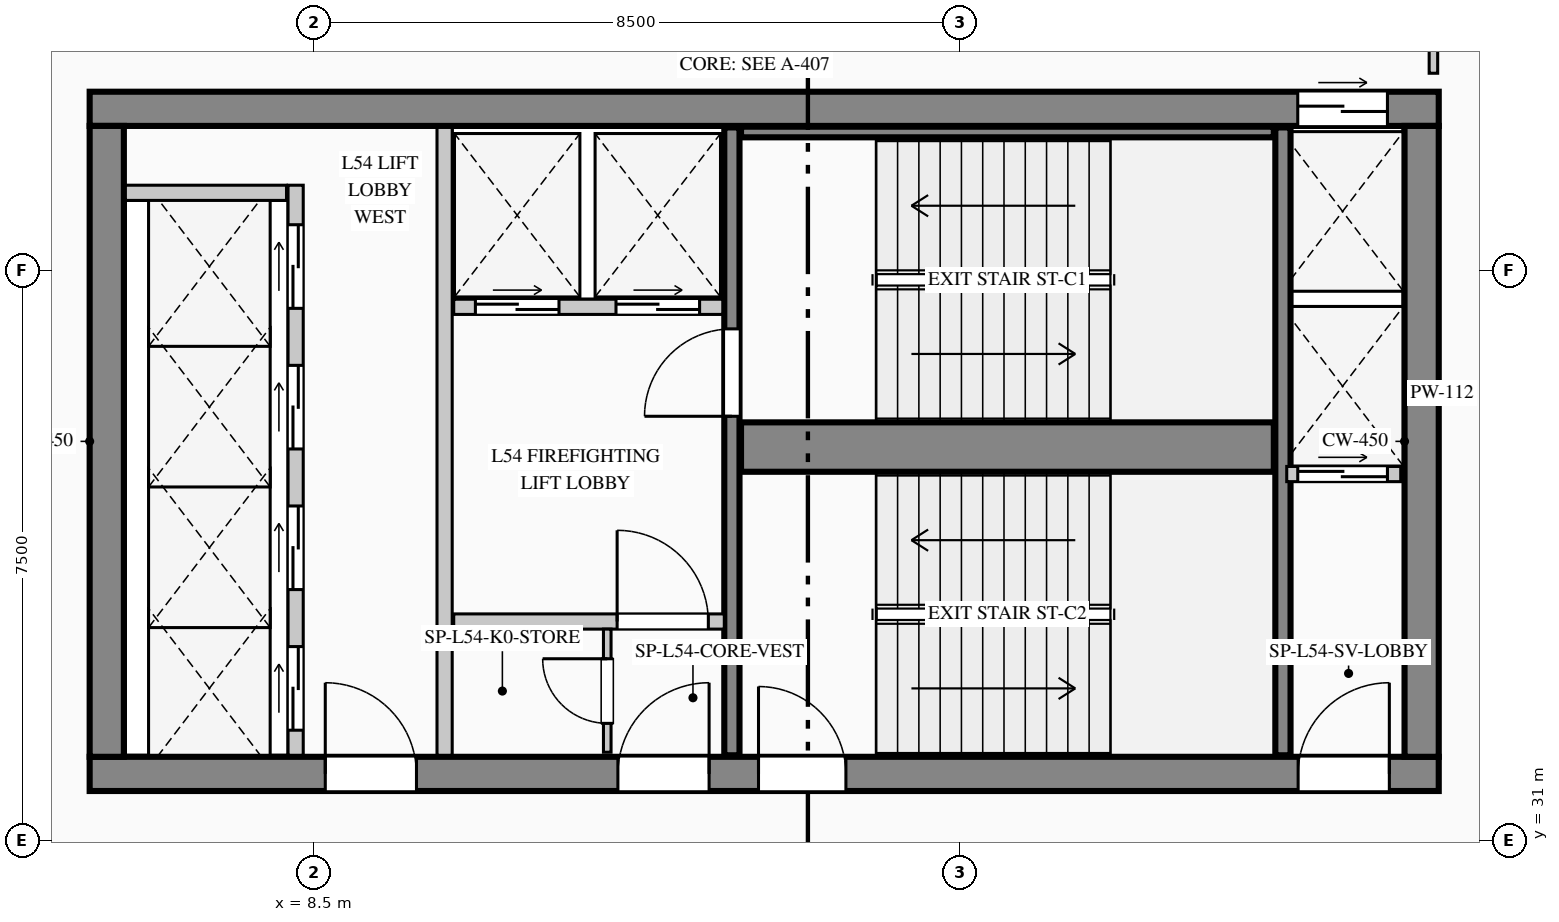
"""IFC4 building model, lengths in metres.
Left out: names, types, materials, properties, quantities, classifications, styles, units other than length and angle.
Written with IfcOpenShell. Run it as: python <this file> out.ifc"""

import sys

from ifc_helpers import new_model, si_unit, direction, frame, frame_2d, origin, place, context, subcontext, project, spatial, rectangle, extrude, element, fill, save


model = new_model("IFC4")
c1 = context("Model", 3, precision=1e-05, world=origin(), true_north=direction((0.0, 1.0)))
c2 = subcontext(c1, "Body", "Model", "MODEL_VIEW")
j1 = project(units=[si_unit("LENGTHUNIT", "METRE"), si_unit("PLANEANGLEUNIT", "RADIAN")], contexts=[c1])
p1 = place(None, origin())
s1 = spatial("IfcSite", under=j1, at=p1, CompositionType="ELEMENT")
p2 = place(p1, origin())
s2 = spatial("IfcBuilding", under=s1, at=p2, CompositionType="ELEMENT")
p3 = place(p2, frame((0.0, 0.0, 227.2)))
s3 = spatial("IfcBuildingStorey", under=s2, at=p3, CompositionType="ELEMENT", Elevation=227.2)
p4 = place(p3, frame((5.55, 40.625, 0.0), z_axis=(0.0, 0.0, 1.0), x_axis=(1.0, 0.0, 0.0)))
e1 = element("IfcWall", 1, at=p4, inside=s3, PredefinedType="SHEAR", context=c2, shape_type="SweptSolid", body=[
    extrude(rectangle(XDim=17.75, YDim=0.45, at=frame_2d((8.875, 0.0))), origin(), (0.0, 0.0, 1.0), 3.95),
])
p5 = place(p4, frame((15.895, 0.0, 0.0)))
e2 = element("IfcOpeningElement", 2, at=p5, cuts=e1, PredefinedType="OPENING", context=c2, shape_type="SweptSolid", body=[
    extrude(rectangle(XDim=1.18, YDim=2.25, at=frame_2d((0.59, 1.125))), frame((0.0, 0.235, 0.0), z_axis=(0.0, -1.0, 0.0), x_axis=(1.0, 0.0, 0.0)), (0.0, 0.0, 1.0), 0.47),
])
p6 = place(p3, frame((5.55, 31.875, 0.0), z_axis=(0.0, 0.0, 1.0), x_axis=(1.0, 0.0, 0.0)))
e3 = element("IfcWall", 3, at=p6, inside=s3, PredefinedType="SHEAR", context=c2, shape_type="SweptSolid", body=[
    extrude(rectangle(XDim=17.75, YDim=0.45, at=frame_2d((8.875, 0.0))), origin(), (0.0, 0.0, 1.0), 3.95),
])
p7 = place(p6, frame((3.1, 0.0, 0.0)))
e4 = element("IfcOpeningElement", 4, at=p7, cuts=e3, PredefinedType="OPENING", context=c2, shape_type="SweptSolid", body=[
    extrude(rectangle(XDim=1.2, YDim=2.2, at=frame_2d((0.6, 1.1))), frame((0.0, 0.235, 0.0), z_axis=(0.0, -1.0, 0.0), x_axis=(1.0, 0.0, 0.0)), (0.0, 0.0, 1.0), 0.47),
])
p8 = place(p6, frame((6.95, 0.0, 0.0)))
e5 = element("IfcOpeningElement", 5, at=p8, cuts=e3, PredefinedType="OPENING", context=c2, shape_type="SweptSolid", body=[
    extrude(rectangle(XDim=1.2, YDim=2.2, at=frame_2d((0.6, 1.1))), frame((0.0, 0.235, 0.0), z_axis=(0.0, -1.0, 0.0), x_axis=(1.0, 0.0, 0.0)), (0.0, 0.0, 1.0), 0.47),
])
p9 = place(p6, frame((8.8, 0.0, 0.0)))
e6 = element("IfcOpeningElement", 6, at=p9, cuts=e3, PredefinedType="OPENING", context=c2, shape_type="SweptSolid", body=[
    extrude(rectangle(XDim=1.15, YDim=2.2, at=frame_2d((0.575, 1.1))), frame((0.0, 0.235, 0.0), z_axis=(0.0, -1.0, 0.0), x_axis=(1.0, 0.0, 0.0)), (0.0, 0.0, 1.0), 0.47),
])
p10 = place(p6, frame((15.9, 0.0, 0.0)))
e7 = element("IfcOpeningElement", 7, at=p10, cuts=e3, PredefinedType="OPENING", context=c2, shape_type="SweptSolid", body=[
    extrude(rectangle(XDim=1.2, YDim=2.2, at=frame_2d((0.6, 1.1))), frame((0.0, 0.235, 0.0), z_axis=(0.0, -1.0, 0.0), x_axis=(1.0, 0.0, 0.0)), (0.0, 0.0, 1.0), 0.47),
])
for number, where, z_axis, x_axis in (
    (8, (5.775, 32.1, 0.0), (0.0, 0.0, 1.0), (0.0, 1.0, 0.0)),
    (9, (23.075, 32.1, 0.0), (0.0, 0.0, 1.0), (0.0, 1.0, 0.0)),
):
    element("IfcWall", number, at=place(p3, frame(where, z_axis=z_axis, x_axis=x_axis)), inside=s3, PredefinedType="SHEAR", context=c2, shape_type="SweptSolid", body=[
        extrude(rectangle(XDim=8.3, YDim=0.45, at=frame_2d((4.15, 0.0))), origin(), (0.0, 0.0, 1.0), 3.95),
    ])
p11 = place(p3, frame((14.0, 32.12, 0.0), z_axis=(0.0, 0.0, 1.0), x_axis=(0.0, 1.0, 0.0)))
e10 = element("IfcWall", 10, at=p11, inside=s3, PredefinedType="SHEAR", context=c2, shape_type="SweptSolid", body=[
    extrude(rectangle(XDim=8.26, YDim=0.2, at=frame_2d((4.13, 0.0))), origin(), (0.0, 0.0, 1.0), 3.95),
])
p12 = place(p11, frame((4.46, 0.0, 0.0)))
e11 = element("IfcOpeningElement", 11, at=p12, cuts=e10, PredefinedType="OPENING", context=c2, shape_type="SweptSolid", body=[
    extrude(rectangle(XDim=1.15, YDim=2.2, at=frame_2d((0.575, 1.1))), frame((0.0, 0.11, 0.0), z_axis=(0.0, -1.0, 0.0), x_axis=(1.0, 0.0, 0.0)), (0.0, 0.0, 1.0), 0.22),
])
p13 = place(p3, frame((14.12, 36.175, 0.0), z_axis=(0.0, 0.0, 1.0), x_axis=(1.0, 0.0, 0.0)))
e12 = element("IfcWall", 12, at=p13, inside=s3, PredefinedType="SHEAR", context=c2, shape_type="SweptSolid", body=[
    extrude(rectangle(XDim=7.01, YDim=0.65, at=frame_2d((3.505, 0.0))), origin(), (0.0, 0.0, 1.0), 3.95),
])
p14 = place(p3, frame((21.25, 32.12, 0.0), z_axis=(0.0, 0.0, 1.0), x_axis=(0.0, 1.0, 0.0)))
e13 = element("IfcWall", 13, at=p14, inside=s3, PredefinedType="SHEAR", context=c2, shape_type="SweptSolid", body=[
    extrude(rectangle(XDim=8.26, YDim=0.2, at=frame_2d((4.13, 0.0))), origin(), (0.0, 0.0, 1.0), 3.95),
])
p15 = place(p3, frame((14.12, 40.32, 0.0), z_axis=(0.0, 0.0, 1.0), x_axis=(1.0, 0.0, 0.0)))
e14 = element("IfcWall", 14, at=p15, inside=s3, PredefinedType="SHEAR", context=c2, shape_type="SweptSolid", body=[
    extrude(rectangle(XDim=7.01, YDim=0.14, at=frame_2d((3.505, 0.0))), origin(), (0.0, 0.0, 1.0), 3.95),
])
p16 = place(p3, frame((7.46, 4.62, 0.0), z_axis=(0.0, 0.0, 1.0), x_axis=(-0.123515576323, 0.992342633573, 0.0)))
e15 = element("IfcWall", 15, at=p16, inside=s3, PredefinedType="STANDARD", context=c2, shape_type="SweptSolid", body=[
    extrude(rectangle(XDim=37.043, YDim=0.24, at=frame_2d((18.522, 0.0))), origin(), (0.0, 0.0, 1.0), 3.7),
])
p17 = place(p16, frame((9.536, 0.0, 0.9)))
e16 = element("IfcOpeningElement", 16, at=p17, cuts=e15, PredefinedType="OPENING", context=c2, shape_type="SweptSolid", body=[
    extrude(rectangle(XDim=2.7, YDim=2.1, at=frame_2d((1.35, 1.05))), frame((0.0, 0.13, 0.0), z_axis=(0.0, -1.0, 0.0), x_axis=(1.0, 0.0, 0.0)), (0.0, 0.0, 1.0), 0.26),
])
p18 = place(p3, frame((8.26, 32.12, 0.0), z_axis=(0.0, 0.0, 1.0), x_axis=(0.0, 1.0, 0.0)))
e17 = element("IfcWall", 17, at=p18, inside=s3, PredefinedType="PARTITIONING", context=c2, shape_type="SweptSolid", body=[
    extrude(rectangle(XDim=7.5, YDim=0.2, at=frame_2d((3.75, 0.0))), origin(), (0.0, 0.0, 1.0), 3.7),
])
p19 = place(p18, frame((0.33, 0.0, 0.0)))
e18 = element("IfcOpeningElement", 18, at=p19, cuts=e17, PredefinedType="OPENING", context=c2, shape_type="SweptSolid", body=[
    extrude(rectangle(XDim=1.1, YDim=2.2, at=frame_2d((0.55, 1.1))), frame((0.0, 0.11, 0.0), z_axis=(0.0, -1.0, 0.0), x_axis=(1.0, 0.0, 0.0)), (0.0, 0.0, 1.0), 0.22),
])
p20 = place(p18, frame((2.18, 0.0, 0.0)))
e19 = element("IfcOpeningElement", 19, at=p20, cuts=e17, PredefinedType="OPENING", context=c2, shape_type="SweptSolid", body=[
    extrude(rectangle(XDim=1.1, YDim=2.2, at=frame_2d((0.55, 1.1))), frame((0.0, 0.11, 0.0), z_axis=(0.0, -1.0, 0.0), x_axis=(1.0, 0.0, 0.0)), (0.0, 0.0, 1.0), 0.22),
])
p21 = place(p18, frame((4.03, 0.0, 0.0)))
e20 = element("IfcOpeningElement", 20, at=p21, cuts=e17, PredefinedType="OPENING", context=c2, shape_type="SweptSolid", body=[
    extrude(rectangle(XDim=1.1, YDim=2.2, at=frame_2d((0.55, 1.1))), frame((0.0, 0.11, 0.0), z_axis=(0.0, -1.0, 0.0), x_axis=(1.0, 0.0, 0.0)), (0.0, 0.0, 1.0), 0.22),
])
p22 = place(p18, frame((5.88, 0.0, 0.0)))
e21 = element("IfcOpeningElement", 21, at=p22, cuts=e17, PredefinedType="OPENING", context=c2, shape_type="SweptSolid", body=[
    extrude(rectangle(XDim=1.1, YDim=2.2, at=frame_2d((0.55, 1.1))), frame((0.0, 0.11, 0.0), z_axis=(0.0, -1.0, 0.0), x_axis=(1.0, 0.0, 0.0)), (0.0, 0.0, 1.0), 0.22),
])
p23 = place(p3, frame((6.02, 39.52, 0.0), z_axis=(0.0, 0.0, 1.0), x_axis=(1.0, 0.0, 0.0)))
e22 = element("IfcWall", 22, at=p23, inside=s3, PredefinedType="PARTITIONING", context=c2, shape_type="SweptSolid", body=[
    extrude(rectangle(XDim=2.12, YDim=0.2, at=frame_2d((1.06, 0.0))), origin(), (0.0, 0.0, 1.0), 3.7),
])
p24 = place(p3, frame((10.22, 32.12, 0.0), z_axis=(0.0, 0.0, 1.0), x_axis=(0.0, 1.0, 0.0)))
e23 = element("IfcWall", 23, at=p24, inside=s3, PredefinedType="PARTITIONING", context=c2, shape_type="SweptSolid", body=[
    extrude(rectangle(XDim=8.26, YDim=0.2, at=frame_2d((4.13, 0.0))), origin(), (0.0, 0.0, 1.0), 3.7),
])
p25 = place(p3, frame((10.34, 38.02, 0.0), z_axis=(0.0, 0.0, 1.0), x_axis=(1.0, 0.0, 0.0)))
e24 = element("IfcWall", 24, at=p25, inside=s3, PredefinedType="PARTITIONING", context=c2, shape_type="SweptSolid", body=[
    extrude(rectangle(XDim=3.54, YDim=0.2, at=frame_2d((1.77, 0.0))), origin(), (0.0, 0.0, 1.0), 3.7),
])
p26 = place(p25, frame((0.285, 0.0, 0.0)))
e25 = element("IfcOpeningElement", 25, at=p26, cuts=e24, PredefinedType="OPENING", context=c2, shape_type="SweptSolid", body=[
    extrude(rectangle(XDim=1.1, YDim=2.2, at=frame_2d((0.55, 1.1))), frame((0.0, 0.11, 0.0), z_axis=(0.0, -1.0, 0.0), x_axis=(1.0, 0.0, 0.0)), (0.0, 0.0, 1.0), 0.22),
])
p27 = place(p25, frame((2.135, 0.0, 0.0)))
e26 = element("IfcOpeningElement", 26, at=p27, cuts=e24, PredefinedType="OPENING", context=c2, shape_type="SweptSolid", body=[
    extrude(rectangle(XDim=1.1, YDim=2.2, at=frame_2d((0.55, 1.1))), frame((0.0, 0.11, 0.0), z_axis=(0.0, -1.0, 0.0), x_axis=(1.0, 0.0, 0.0)), (0.0, 0.0, 1.0), 0.22),
])
p28 = place(p3, frame((10.34, 33.88, 0.0), z_axis=(0.0, 0.0, 1.0), x_axis=(1.0, 0.0, 0.0)))
e27 = element("IfcWall", 27, at=p28, inside=s3, PredefinedType="PARTITIONING", context=c2, shape_type="SweptSolid", body=[
    extrude(rectangle(XDim=3.56, YDim=0.2, at=frame_2d((1.78, 0.0))), origin(), (0.0, 0.0, 1.0), 3.7),
])
p29 = place(p28, frame((2.15, 0.0, 0.0)))
e28 = element("IfcOpeningElement", 28, at=p29, cuts=e27, PredefinedType="OPENING", context=c2, shape_type="SweptSolid", body=[
    extrude(rectangle(XDim=1.2, YDim=2.2, at=frame_2d((0.6, 1.1))), frame((0.0, 0.11, 0.0), z_axis=(0.0, -1.0, 0.0), x_axis=(1.0, 0.0, 0.0)), (0.0, 0.0, 1.0), 0.22),
])
p30 = place(p3, frame((12.36, 32.16, 0.0), z_axis=(0.0, 0.0, 1.0), x_axis=(0.0, 1.0, 0.0)))
e29 = element("IfcWall", 29, at=p30, inside=s3, PredefinedType="PARTITIONING", context=c2, shape_type="SweptSolid", body=[
    extrude(rectangle(XDim=1.62, YDim=0.1, at=frame_2d((0.81, 0.0))), origin(), (0.0, 0.0, 1.0), 3.7),
])
p31 = place(p30, frame((0.38, 0.0, 0.0)))
e30 = element("IfcOpeningElement", 30, at=p31, cuts=e29, PredefinedType="OPENING", context=c2, shape_type="SweptSolid", body=[
    extrude(rectangle(XDim=0.85, YDim=2.1, at=frame_2d((0.425, 1.05))), frame((0.0, 0.06, 0.0), z_axis=(0.0, -1.0, 0.0), x_axis=(1.0, 0.0, 0.0)), (0.0, 0.0, 1.0), 0.12),
])
p32 = place(p3, frame((21.3, 35.82, 0.0), z_axis=(0.0, 0.0, 1.0), x_axis=(1.0, 0.0, 0.0)))
e31 = element("IfcWall", 31, at=p32, inside=s3, PredefinedType="PARTITIONING", context=c2, shape_type="SweptSolid", body=[
    extrude(rectangle(XDim=1.5, YDim=0.2, at=frame_2d((0.75, 0.0))), origin(), (0.0, 0.0, 1.0), 3.7),
])
p33 = place(p32, frame((0.145, 0.0, 0.0)))
e32 = element("IfcOpeningElement", 32, at=p33, cuts=e31, PredefinedType="OPENING", context=c2, shape_type="SweptSolid", body=[
    extrude(rectangle(XDim=1.18, YDim=2.25, at=frame_2d((0.59, 1.125))), frame((0.0, 0.11, 0.0), z_axis=(0.0, -1.0, 0.0), x_axis=(1.0, 0.0, 0.0)), (0.0, 0.0, 1.0), 0.22),
])
p34 = place(p3, frame((23.23, 41.093, 0.0), z_axis=(0.0, 0.0, 1.0), x_axis=(0.0, 1.0, 0.0)))
e33 = element("IfcWall", 33, at=p34, inside=s3, PredefinedType="PARTITIONING", context=c2, shape_type="SweptSolid", body=[
    extrude(rectangle(XDim=2.162, YDim=0.112, at=frame_2d((1.081, 0.0))), origin(), (0.0, 0.0, 1.0), 3.7),
])
p35 = place(p7, origin())
e34 = element("IfcDoor", 34, at=p35, inside=s3, OperationType="SINGLE_SWING_LEFT", PredefinedType="DOOR", context=c2, shape_type="SweptSolid", body=[
    extrude(rectangle(XDim=1.2, YDim=2.2, at=frame_2d((0.6, 1.1))), frame((0.0, 0.025, 0.0), z_axis=(0.0, -1.0, 0.0), x_axis=(1.0, 0.0, 0.0)), (0.0, 0.0, 1.0), 0.05),
])
fill(e4, e34)
p36 = place(p8, origin())
e35 = element("IfcDoor", 35, at=p36, inside=s3, OperationType="SINGLE_SWING_RIGHT", PredefinedType="DOOR", context=c2, shape_type="SweptSolid", body=[
    extrude(rectangle(XDim=1.2, YDim=2.2, at=frame_2d((0.6, 1.1))), frame((0.0, 0.025, 0.0), z_axis=(0.0, -1.0, 0.0), x_axis=(1.0, 0.0, 0.0)), (0.0, 0.0, 1.0), 0.05),
])
fill(e5, e35)
p37 = place(p9, origin())
e36 = element("IfcDoor", 36, at=p37, inside=s3, OperationType="SINGLE_SWING_LEFT", PredefinedType="DOOR", context=c2, shape_type="SweptSolid", body=[
    extrude(rectangle(XDim=1.15, YDim=2.2, at=frame_2d((0.575, 1.1))), frame((0.0, 0.025, 0.0), z_axis=(0.0, -1.0, 0.0), x_axis=(1.0, 0.0, 0.0)), (0.0, 0.0, 1.0), 0.05),
])
fill(e6, e36)
p38 = place(p10, origin())
e37 = element("IfcDoor", 37, at=p38, inside=s3, OperationType="SINGLE_SWING_RIGHT", PredefinedType="DOOR", context=c2, shape_type="SweptSolid", body=[
    extrude(rectangle(XDim=1.2, YDim=2.2, at=frame_2d((0.6, 1.1))), frame((0.0, 0.025, 0.0), z_axis=(0.0, -1.0, 0.0), x_axis=(1.0, 0.0, 0.0)), (0.0, 0.0, 1.0), 0.05),
])
fill(e7, e37)
p39 = place(p29, origin())
e38 = element("IfcDoor", 38, at=p39, inside=s3, OperationType="SINGLE_SWING_LEFT", PredefinedType="DOOR", context=c2, shape_type="SweptSolid", body=[
    extrude(rectangle(XDim=1.2, YDim=2.2, at=frame_2d((0.6, 1.1))), frame((0.0, 0.025, 0.0), z_axis=(0.0, -1.0, 0.0), x_axis=(1.0, 0.0, 0.0)), (0.0, 0.0, 1.0), 0.05),
])
fill(e28, e38)
p40 = place(p31, origin())
e39 = element("IfcDoor", 39, at=p40, inside=s3, OperationType="SINGLE_SWING_RIGHT", PredefinedType="DOOR", context=c2, shape_type="SweptSolid", body=[
    extrude(rectangle(XDim=0.85, YDim=2.1, at=frame_2d((0.425, 1.05))), frame((0.0, 0.025, 0.0), z_axis=(0.0, -1.0, 0.0), x_axis=(1.0, 0.0, 0.0)), (0.0, 0.0, 1.0), 0.05),
])
fill(e30, e39)
p41 = place(p12, origin())
e40 = element("IfcDoor", 40, at=p41, inside=s3, OperationType="SINGLE_SWING_LEFT", PredefinedType="DOOR", context=c2, shape_type="SweptSolid", body=[
    extrude(rectangle(XDim=1.15, YDim=2.2, at=frame_2d((0.575, 1.1))), frame((0.0, 0.025, 0.0), z_axis=(0.0, -1.0, 0.0), x_axis=(1.0, 0.0, 0.0)), (0.0, 0.0, 1.0), 0.05),
])
fill(e11, e40)
p42 = place(p19, origin())
e41 = element("IfcDoor", 41, at=p42, inside=s3, OperationType="DOUBLE_DOOR_SLIDING", PredefinedType="DOOR", context=c2, shape_type="SweptSolid", body=[
    extrude(rectangle(XDim=1.1, YDim=2.2, at=frame_2d((0.55, 1.1))), frame((0.0, 0.025, 0.0), z_axis=(0.0, -1.0, 0.0), x_axis=(1.0, 0.0, 0.0)), (0.0, 0.0, 1.0), 0.05),
])
fill(e18, e41)
p43 = place(p20, origin())
e42 = element("IfcDoor", 42, at=p43, inside=s3, OperationType="DOUBLE_DOOR_SLIDING", PredefinedType="DOOR", context=c2, shape_type="SweptSolid", body=[
    extrude(rectangle(XDim=1.1, YDim=2.2, at=frame_2d((0.55, 1.1))), frame((0.0, 0.025, 0.0), z_axis=(0.0, -1.0, 0.0), x_axis=(1.0, 0.0, 0.0)), (0.0, 0.0, 1.0), 0.05),
])
fill(e19, e42)
p44 = place(p21, origin())
e43 = element("IfcDoor", 43, at=p44, inside=s3, OperationType="DOUBLE_DOOR_SLIDING", PredefinedType="DOOR", context=c2, shape_type="SweptSolid", body=[
    extrude(rectangle(XDim=1.1, YDim=2.2, at=frame_2d((0.55, 1.1))), frame((0.0, 0.025, 0.0), z_axis=(0.0, -1.0, 0.0), x_axis=(1.0, 0.0, 0.0)), (0.0, 0.0, 1.0), 0.05),
])
fill(e20, e43)
p45 = place(p22, origin())
e44 = element("IfcDoor", 44, at=p45, inside=s3, OperationType="DOUBLE_DOOR_SLIDING", PredefinedType="DOOR", context=c2, shape_type="SweptSolid", body=[
    extrude(rectangle(XDim=1.1, YDim=2.2, at=frame_2d((0.55, 1.1))), frame((0.0, 0.025, 0.0), z_axis=(0.0, -1.0, 0.0), x_axis=(1.0, 0.0, 0.0)), (0.0, 0.0, 1.0), 0.05),
])
fill(e21, e44)
p46 = place(p26, origin())
e45 = element("IfcDoor", 45, at=p46, inside=s3, OperationType="DOUBLE_DOOR_SLIDING", PredefinedType="DOOR", context=c2, shape_type="SweptSolid", body=[
    extrude(rectangle(XDim=1.1, YDim=2.2, at=frame_2d((0.55, 1.1))), frame((0.0, 0.025, 0.0), z_axis=(0.0, -1.0, 0.0), x_axis=(1.0, 0.0, 0.0)), (0.0, 0.0, 1.0), 0.05),
])
fill(e25, e45)
p47 = place(p27, origin())
e46 = element("IfcDoor", 46, at=p47, inside=s3, OperationType="DOUBLE_DOOR_SLIDING", PredefinedType="DOOR", context=c2, shape_type="SweptSolid", body=[
    extrude(rectangle(XDim=1.1, YDim=2.2, at=frame_2d((0.55, 1.1))), frame((0.0, 0.025, 0.0), z_axis=(0.0, -1.0, 0.0), x_axis=(1.0, 0.0, 0.0)), (0.0, 0.0, 1.0), 0.05),
])
fill(e26, e46)
p48 = place(p5, origin())
e47 = element("IfcDoor", 47, at=p48, inside=s3, OperationType="DOUBLE_DOOR_SLIDING", PredefinedType="DOOR", context=c2, shape_type="SweptSolid", body=[
    extrude(rectangle(XDim=1.18, YDim=2.25, at=frame_2d((0.59, 1.125))), frame((0.0, 0.025, 0.0), z_axis=(0.0, -1.0, 0.0), x_axis=(1.0, 0.0, 0.0)), (0.0, 0.0, 1.0), 0.05),
])
fill(e2, e47)
p49 = place(p33, origin())
e48 = element("IfcDoor", 48, at=p49, inside=s3, OperationType="DOUBLE_DOOR_SLIDING", PredefinedType="DOOR", context=c2, shape_type="SweptSolid", body=[
    extrude(rectangle(XDim=1.18, YDim=2.25, at=frame_2d((0.59, 1.125))), frame((0.0, 0.025, 0.0), z_axis=(0.0, -1.0, 0.0), x_axis=(1.0, 0.0, 0.0)), (0.0, 0.0, 1.0), 0.05),
])
fill(e32, e48)
save(model, sys.argv[1])
